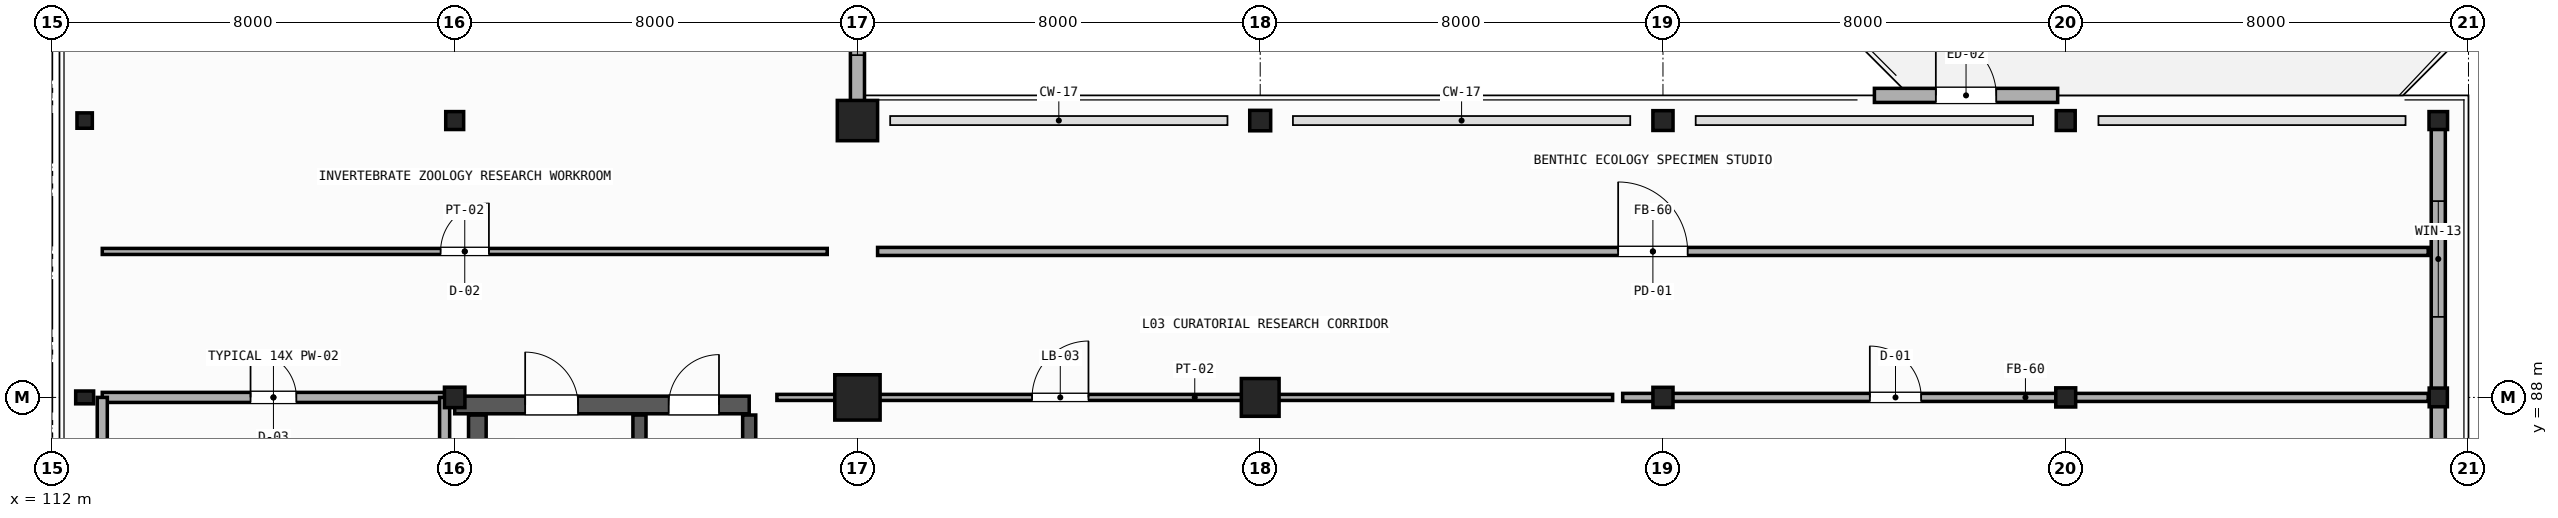
"""IFC4 building model, lengths in metres.
Left out: names, types, materials, properties, quantities, classifications, styles, units other than length and angle.
Written with IfcOpenShell. Run it as: python <this file> out.ifc"""

import sys

from ifc_helpers import new_model, si_unit, direction, frame, frame_2d, origin, origin_2d, place, context, subcontext, project, spatial, rectangle, hollow_rectangle, circle, hollow_circle, i_section, extrude, element, fill, save


model = new_model("IFC4")
c1 = context("Model", 3, precision=1e-05, world=origin(), true_north=direction((0.0, 1.0)))
c2 = subcontext(c1, "Body", "Model", "MODEL_VIEW")
j1 = project(units=[si_unit("LENGTHUNIT", "METRE"), si_unit("PLANEANGLEUNIT", "RADIAN")], contexts=[c1])
p1 = place(None, origin())
s1 = spatial("IfcSite", under=j1, at=p1, CompositionType="ELEMENT")
p2 = place(p1, origin())
s2 = spatial("IfcBuilding", under=s1, at=p2, CompositionType="ELEMENT")
p3 = place(p2, frame((0.0, 0.0, 15.0)))
s3 = spatial("IfcBuildingStorey", under=s2, at=p3, CompositionType="ELEMENT", Elevation=15.0)
p4 = place(p3, frame((112.65, 88.0, 0.0), z_axis=(0.0, 0.0, 1.0), x_axis=(0.0, 1.0, 0.0)))
e1 = element("IfcColumn", 1, at=p4, inside=s3, PredefinedType="COLUMN", context=c2, shape_type="SweptSolid", body=[
    extrude(hollow_rectangle(XDim=0.254, YDim=0.356, WallThickness=0.012, InnerFilletRadius=0.012, OuterFilletRadius=0.024, at=origin_2d()), origin(), (0.0, 0.0, 1.0), 4.58),
])
p5 = place(p3, frame((112.65, 93.5, 0.0), z_axis=(0.0, 0.0, 1.0), x_axis=(1.0, 0.0, 0.0)))
e2 = element("IfcColumn", 2, at=p5, inside=s3, PredefinedType="COLUMN", context=c2, shape_type="SweptSolid", body=[
    extrude(hollow_rectangle(XDim=0.305, YDim=0.305, WallThickness=0.012, InnerFilletRadius=0.012, OuterFilletRadius=0.024, at=origin_2d()), origin(), (0.0, 0.0, 1.0), 4.58),
])
p6 = place(p3, frame((120.0, 88.0, 0.0), z_axis=(0.0, 0.0, 1.0), x_axis=(1.0, 0.0, 0.0)))
e3 = element("IfcColumn", 3, at=p6, inside=s3, PredefinedType="COLUMN", context=c2, shape_type="SweptSolid", body=[
    extrude(hollow_circle(Radius=0.203, WallThickness=0.012, at=origin_2d()), origin(), (0.0, 0.0, 1.0), 4.58),
])
p7 = place(p3, frame((120.0, 93.5, 0.0), z_axis=(0.0, 0.0, 1.0), x_axis=(0.0, 1.0, 0.0)))
e4 = element("IfcColumn", 4, at=p7, inside=s3, PredefinedType="COLUMN", context=c2, shape_type="SweptSolid", body=[
    extrude(hollow_circle(Radius=0.178, WallThickness=0.012, at=origin_2d()), origin(), (0.0, 0.0, 1.0), 4.58),
])
p8 = place(p3, frame((128.0, 88.0, 0.0), z_axis=(0.0, 0.0, 1.0), x_axis=(0.0, 1.0, 0.0)))
e5 = element("IfcColumn", 5, at=p8, inside=s3, PredefinedType="COLUMN", context=c2, shape_type="SweptSolid", body=[
    extrude(rectangle(XDim=0.9, YDim=0.9, at=origin_2d()), origin(), (0.0, 0.0, 1.0), 4.58),
])
p9 = place(p3, frame((128.0, 93.5, 0.0), z_axis=(0.0, 0.0, 1.0), x_axis=(1.0, 0.0, 0.0)))
e6 = element("IfcColumn", 6, at=p9, inside=s3, PredefinedType="COLUMN", context=c2, shape_type="SweptSolid", body=[
    extrude(rectangle(XDim=0.8, YDim=0.8, at=origin_2d()), origin(), (0.0, 0.0, 1.0), 4.58),
])
p10 = place(p3, frame((136.0, 88.0, 0.0), z_axis=(0.0, 0.0, 1.0), x_axis=(1.0, 0.0, 0.0)))
e7 = element("IfcColumn", 7, at=p10, inside=s3, PredefinedType="COLUMN", context=c2, shape_type="SweptSolid", body=[
    extrude(circle(Radius=0.375, at=origin_2d()), origin(), (0.0, 0.0, 1.0), 4.58),
])
p11 = place(p3, frame((136.0, 93.5, 0.0), z_axis=(0.0, 0.0, 1.0), x_axis=(0.0, 1.0, 0.0)))
e8 = element("IfcColumn", 8, at=p11, inside=s3, PredefinedType="COLUMN", context=c2, shape_type="SweptSolid", body=[
    extrude(i_section(OverallWidth=0.406, OverallDepth=0.416, WebThickness=0.03, FlangeThickness=0.048, FilletRadius=0.015, at=origin_2d()), origin(), (0.0, 0.0, 1.0), 4.58),
])
p12 = place(p3, frame((144.0, 88.0, 0.0), z_axis=(0.0, 0.0, 1.0), x_axis=(0.0, 1.0, 0.0)))
e9 = element("IfcColumn", 9, at=p12, inside=s3, PredefinedType="COLUMN", context=c2, shape_type="SweptSolid", body=[
    extrude(i_section(OverallWidth=0.401, OverallDepth=0.399, WebThickness=0.025, FlangeThickness=0.04, FilletRadius=0.015, at=origin_2d()), origin(), (0.0, 0.0, 1.0), 4.58),
])
p13 = place(p3, frame((144.0, 93.5, 0.0), z_axis=(0.0, 0.0, 1.0), x_axis=(1.0, 0.0, 0.0)))
e10 = element("IfcColumn", 10, at=p13, inside=s3, PredefinedType="COLUMN", context=c2, shape_type="SweptSolid", body=[
    extrude(i_section(OverallWidth=0.4, OverallDepth=0.393, WebThickness=0.023, FlangeThickness=0.037, FilletRadius=0.015, at=origin_2d()), origin(), (0.0, 0.0, 1.0), 4.58),
])
p14 = place(p3, frame((152.0, 88.0, 0.0), z_axis=(0.0, 0.0, 1.0), x_axis=(1.0, 0.0, 0.0)))
e11 = element("IfcColumn", 11, at=p14, inside=s3, PredefinedType="COLUMN", context=c2, shape_type="SweptSolid", body=[
    extrude(i_section(OverallWidth=0.395, OverallDepth=0.38, WebThickness=0.019, FlangeThickness=0.03, FilletRadius=0.015, at=origin_2d()), origin(), (0.0, 0.0, 1.0), 4.8),
])
p15 = place(p3, frame((152.0, 93.5, 0.0), z_axis=(0.0, 0.0, 1.0), x_axis=(0.0, 1.0, 0.0)))
e12 = element("IfcColumn", 12, at=p15, inside=s3, PredefinedType="COLUMN", context=c2, shape_type="SweptSolid", body=[
    extrude(i_section(OverallWidth=0.394, OverallDepth=0.376, WebThickness=0.017, FlangeThickness=0.028, FilletRadius=0.015, at=origin_2d()), origin(), (0.0, 0.0, 1.0), 4.8),
])
p16 = place(p3, frame((159.4, 88.0, 0.0), z_axis=(0.0, 0.0, 1.0), x_axis=(0.0, 1.0, 0.0)))
e13 = element("IfcColumn", 13, at=p16, inside=s3, PredefinedType="COLUMN", context=c2, shape_type="SweptSolid", body=[
    extrude(i_section(OverallWidth=0.371, OverallDepth=0.361, WebThickness=0.012, FlangeThickness=0.02, FilletRadius=0.015, at=origin_2d()), origin(), (0.0, 0.0, 1.0), 4.8),
])
p17 = place(p3, frame((159.4, 93.5, 0.0), z_axis=(0.0, 0.0, 1.0), x_axis=(1.0, 0.0, 0.0)))
e14 = element("IfcColumn", 14, at=p17, inside=s3, PredefinedType="COLUMN", context=c2, shape_type="SweptSolid", body=[
    extrude(i_section(OverallWidth=0.368, OverallDepth=0.356, WebThickness=0.011, FlangeThickness=0.018, FilletRadius=0.015, at=origin_2d()), origin(), (0.0, 0.0, 1.0), 4.8),
])
p18 = place(p3, frame((148.2, 94.0, 0.0), z_axis=(0.0, 0.0, 1.0), x_axis=(1.0, 0.0, 0.0)))
e15 = element("IfcWall", 15, at=p18, inside=s3, PredefinedType="STANDARD", context=c2, shape_type="SweptSolid", body=[
    extrude(rectangle(XDim=3.64, YDim=0.28, at=frame_2d((1.82, 0.0))), origin(), (0.0, 0.0, 1.0), 4.3),
])
p19 = place(p18, frame((1.22, 0.0, 0.0)))
e16 = element("IfcOpeningElement", 16, at=p19, cuts=e15, PredefinedType="OPENING", context=c2, shape_type="SweptSolid", body=[
    extrude(rectangle(XDim=1.2, YDim=2.15, at=frame_2d((0.6, 1.075))), frame((0.0, 0.15, 0.0), z_axis=(0.0, -1.0, 0.0), x_axis=(1.0, 0.0, 0.0)), (0.0, 0.0, 1.0), 0.3),
])
p20 = place(p3, frame((159.4, 80.65, 0.0), z_axis=(0.0, 0.0, 1.0), x_axis=(0.0, 1.0, 0.0)))
e17 = element("IfcWall", 17, at=p20, inside=s3, PredefinedType="STANDARD", context=c2, shape_type="SweptSolid", body=[
    extrude(rectangle(XDim=7.35, YDim=0.28, at=frame_2d((3.675, 0.0))), origin(), (0.0, 0.0, 1.0), 4.48),
])
p21 = place(p20, frame((1.317, 0.0, 1.05)))
e18 = element("IfcOpeningElement", 18, at=p21, cuts=e17, PredefinedType="OPENING", context=c2, shape_type="SweptSolid", body=[
    extrude(rectangle(XDim=1.7, YDim=1.8, at=frame_2d((0.85, 0.9))), frame((0.0, 0.15, 0.0), z_axis=(0.0, -1.0, 0.0), x_axis=(1.0, 0.0, 0.0)), (0.0, 0.0, 1.0), 0.3),
])
p22 = place(p20, frame((4.333, 0.0, 1.05)))
e19 = element("IfcOpeningElement", 19, at=p22, cuts=e17, PredefinedType="OPENING", context=c2, shape_type="SweptSolid", body=[
    extrude(rectangle(XDim=1.7, YDim=1.8, at=frame_2d((0.85, 0.9))), frame((0.0, 0.15, 0.0), z_axis=(0.0, -1.0, 0.0), x_axis=(1.0, 0.0, 0.0)), (0.0, 0.0, 1.0), 0.3),
])
p23 = place(p3, frame((159.4, 88.0, 0.0), z_axis=(0.0, 0.0, 1.0), x_axis=(0.0, 1.0, 0.0)))
e20 = element("IfcWall", 20, at=p23, inside=s3, PredefinedType="STANDARD", context=c2, shape_type="SweptSolid", body=[
    extrude(rectangle(XDim=5.5, YDim=0.28, at=frame_2d((2.75, 0.0))), origin(), (0.0, 0.0, 1.0), 4.48),
])
p24 = place(p23, frame((1.6, 0.0, 2.25)))
e21 = element("IfcOpeningElement", 21, at=p24, cuts=e20, PredefinedType="OPENING", context=c2, shape_type="SweptSolid", body=[
    extrude(rectangle(XDim=2.3, YDim=1.2, at=frame_2d((1.15, 0.6))), frame((0.0, 0.15, 0.0), z_axis=(0.0, -1.0, 0.0), x_axis=(1.0, 0.0, 0.0)), (0.0, 0.0, 1.0), 0.3),
])
p25 = place(p3, frame((128.0, 93.5, 0.0), z_axis=(0.0, 0.0, 1.0), x_axis=(0.0, 1.0, 0.0)))
e22 = element("IfcWall", 22, at=p25, inside=s3, PredefinedType="STANDARD", context=c2, shape_type="SweptSolid", body=[
    extrude(rectangle(XDim=7.5, YDim=0.28, at=frame_2d((3.75, 0.0))), origin(), (0.0, 0.0, 1.0), 3.778),
])
p26 = place(p25, frame((1.3, 0.0, 2.3)))
e23 = element("IfcOpeningElement", 23, at=p26, cuts=e22, PredefinedType="OPENING", context=c2, shape_type="SweptSolid", body=[
    extrude(rectangle(XDim=1.8, YDim=1.1, at=frame_2d((0.9, 0.55))), frame((0.0, 0.15, 0.0), z_axis=(0.0, -1.0, 0.0), x_axis=(1.0, 0.0, 0.0)), (0.0, 0.0, 1.0), 0.3),
])
p27 = place(p25, frame((4.4, 0.0, 2.3)))
e24 = element("IfcOpeningElement", 24, at=p27, cuts=e22, PredefinedType="OPENING", context=c2, shape_type="SweptSolid", body=[
    extrude(rectangle(XDim=1.8, YDim=1.1, at=frame_2d((0.9, 0.55))), frame((0.0, 0.15, 0.0), z_axis=(0.0, -1.0, 0.0), x_axis=(1.0, 0.0, 0.0)), (0.0, 0.0, 1.0), 0.3),
])
p28 = place(p3, frame((120.0, 87.85, 0.0), z_axis=(0.0, 0.0, 1.0), x_axis=(1.0, 0.0, 0.0)))
e25 = element("IfcWall", 25, at=p28, inside=s3, PredefinedType="SHEAR", context=c2, shape_type="SweptSolid", body=[
    extrude(rectangle(XDim=5.85, YDim=0.35, at=frame_2d((2.925, 0.0))), origin(), (0.0, 0.0, 1.0), 4.57),
])
p29 = place(p28, frame((1.4, 0.0, 0.0)))
e26 = element("IfcOpeningElement", 26, at=p29, cuts=e25, PredefinedType="OPENING", context=c2, shape_type="SweptSolid", body=[
    extrude(rectangle(XDim=1.05, YDim=2.1, at=frame_2d((0.525, 1.05))), frame((0.0, 0.185, 0.0), z_axis=(0.0, -1.0, 0.0), x_axis=(1.0, 0.0, 0.0)), (0.0, 0.0, 1.0), 0.37),
])
p30 = place(p28, frame((4.25, 0.0, 0.0)))
e27 = element("IfcOpeningElement", 27, at=p30, cuts=e25, PredefinedType="OPENING", context=c2, shape_type="SweptSolid", body=[
    extrude(rectangle(XDim=1.0, YDim=2.15, at=frame_2d((0.5, 1.075))), frame((0.0, 0.185, 0.0), z_axis=(0.0, -1.0, 0.0), x_axis=(1.0, 0.0, 0.0)), (0.0, 0.0, 1.0), 0.37),
])
p31 = place(p3, frame((120.45, 80.7, 0.0), z_axis=(0.0, 0.0, 1.0), x_axis=(0.0, 1.0, 0.0)))
e28 = element("IfcWall", 28, at=p31, inside=s3, PredefinedType="SHEAR", context=c2, shape_type="SweptSolid", body=[
    extrude(rectangle(XDim=6.95, YDim=0.35, at=frame_2d((3.475, 0.0))), origin(), (0.0, 0.0, 1.0), 4.57),
])
for number, where, z_axis, x_axis in (
    (29, (125.85, 80.7, 0.0), (0.0, 0.0, 1.0), (0.0, 1.0, 0.0)),
    (30, (123.67, 80.7, 0.0), (0.0, 0.0, 1.0), (0.0, 1.0, 0.0)),
):
    element("IfcWall", number, at=place(p3, frame(where, z_axis=z_axis, x_axis=x_axis)), inside=s3, PredefinedType="SHEAR", context=c2, shape_type="SweptSolid", body=[
        extrude(rectangle(XDim=6.95, YDim=0.26, at=frame_2d((3.475, 0.0))), origin(), (0.0, 0.0, 1.0), 4.57),
    ])
p32 = place(p3, frame((113.0, 88.0, 0.0), z_axis=(0.0, 0.0, 1.0), x_axis=(1.0, 0.0, 0.0)))
e31 = element("IfcWall", 31, at=p32, inside=s3, PredefinedType="PLUMBINGWALL", context=c2, shape_type="SweptSolid", body=[
    extrude(rectangle(XDim=6.8, YDim=0.2, at=frame_2d((3.4, 0.0))), origin(), (0.0, 0.0, 1.0), 3.932),
])
p33 = place(p32, frame((2.945, 0.0, 0.0)))
e32 = element("IfcOpeningElement", 32, at=p33, cuts=e31, PredefinedType="OPENING", context=c2, shape_type="SweptSolid", body=[
    extrude(rectangle(XDim=0.91, YDim=2.1, at=frame_2d((0.455, 1.05))), frame((0.0, 0.11, 0.0), z_axis=(0.0, -1.0, 0.0), x_axis=(1.0, 0.0, 0.0)), (0.0, 0.0, 1.0), 0.22),
])
p34 = place(p3, frame((113.0, 80.8, 0.0), z_axis=(0.0, 0.0, 1.0), x_axis=(0.0, 1.0, 0.0)))
e33 = element("IfcWall", 33, at=p34, inside=s3, PredefinedType="PLUMBINGWALL", context=c2, shape_type="SweptSolid", body=[
    extrude(rectangle(XDim=7.2, YDim=0.2, at=frame_2d((3.6, 0.0))), origin(), (0.0, 0.0, 1.0), 4.29),
])
p35 = place(p3, frame((119.8, 80.8, 0.0), z_axis=(0.0, 0.0, 1.0), x_axis=(0.0, 1.0, 0.0)))
e34 = element("IfcWall", 34, at=p35, inside=s3, PredefinedType="PLUMBINGWALL", context=c2, shape_type="SweptSolid", body=[
    extrude(rectangle(XDim=7.2, YDim=0.2, at=frame_2d((3.6, 0.0))), origin(), (0.0, 0.0, 1.0), 4.007),
])
p36 = place(p3, frame((126.4, 88.0, 0.0), z_axis=(0.0, 0.0, 1.0), x_axis=(1.0, 0.0, 0.0)))
e35 = element("IfcWall", 35, at=p36, inside=s3, PredefinedType="PARTITIONING", context=c2, shape_type="SweptSolid", body=[
    extrude(rectangle(XDim=16.6, YDim=0.12, at=frame_2d((8.3, 0.0))), origin(), (0.0, 0.0, 1.0), 3.778),
])
p37 = place(p36, frame((5.069, 0.0, 0.0)))
e36 = element("IfcOpeningElement", 36, at=p37, cuts=e35, PredefinedType="OPENING", context=c2, shape_type="SweptSolid", body=[
    extrude(rectangle(XDim=1.12, YDim=2.15, at=frame_2d((0.56, 1.075))), frame((0.0, 0.07, 0.0), z_axis=(0.0, -1.0, 0.0), x_axis=(1.0, 0.0, 0.0)), (0.0, 0.0, 1.0), 0.14),
])
p38 = place(p3, frame((143.2, 88.0, 0.0), z_axis=(0.0, 0.0, 1.0), x_axis=(1.0, 0.0, 0.0)))
e37 = element("IfcWall", 37, at=p38, inside=s3, PredefinedType="PARTITIONING", context=c2, shape_type="SweptSolid", body=[
    extrude(rectangle(XDim=16.0, YDim=0.16, at=frame_2d((8.0, 0.0))), origin(), (0.0, 0.0, 1.0), 3.778),
])
p39 = place(p38, frame((4.909, 0.0, 0.0)))
e38 = element("IfcOpeningElement", 38, at=p39, cuts=e37, PredefinedType="OPENING", context=c2, shape_type="SweptSolid", body=[
    extrude(rectangle(XDim=1.02, YDim=2.15, at=frame_2d((0.51, 1.075))), frame((0.0, 0.09, 0.0), z_axis=(0.0, -1.0, 0.0), x_axis=(1.0, 0.0, 0.0)), (0.0, 0.0, 1.0), 0.18),
])
p40 = place(p3, frame((113.0, 90.9, 0.0), z_axis=(0.0, 0.0, 1.0), x_axis=(1.0, 0.0, 0.0)))
e39 = element("IfcWall", 39, at=p40, inside=s3, PredefinedType="PARTITIONING", context=c2, shape_type="SweptSolid", body=[
    extrude(rectangle(XDim=14.4, YDim=0.12, at=frame_2d((7.2, 0.0))), origin(), (0.0, 0.0, 1.0), 3.778),
])
p41 = place(p40, frame((6.72, 0.0, 0.0)))
e40 = element("IfcOpeningElement", 40, at=p41, cuts=e39, PredefinedType="OPENING", context=c2, shape_type="SweptSolid", body=[
    extrude(rectangle(XDim=0.96, YDim=2.1, at=frame_2d((0.48, 1.05))), frame((0.0, 0.07, 0.0), z_axis=(0.0, -1.0, 0.0), x_axis=(1.0, 0.0, 0.0)), (0.0, 0.0, 1.0), 0.14),
])
p42 = place(p3, frame((128.4, 90.9, 0.0), z_axis=(0.0, 0.0, 1.0), x_axis=(1.0, 0.0, 0.0)))
e41 = element("IfcWall", 41, at=p42, inside=s3, PredefinedType="PARTITIONING", context=c2, shape_type="SweptSolid", body=[
    extrude(rectangle(XDim=30.8, YDim=0.16, at=frame_2d((15.4, 0.0))), origin(), (0.0, 0.0, 1.0), 3.857),
])
p43 = place(p42, frame((14.71, 0.0, 0.0)))
e42 = element("IfcOpeningElement", 42, at=p43, cuts=e41, PredefinedType="OPENING", context=c2, shape_type="SweptSolid", body=[
    extrude(rectangle(XDim=1.38, YDim=2.25, at=frame_2d((0.69, 1.125))), frame((0.0, 0.09, 0.0), z_axis=(0.0, -1.0, 0.0), x_axis=(1.0, 0.0, 0.0)), (0.0, 0.0, 1.0), 0.18),
])
p44 = place(p19, origin())
e43 = element("IfcDoor", 43, at=p44, inside=s3, OperationType="SINGLE_SWING_LEFT", PredefinedType="DOOR", context=c2, shape_type="SweptSolid", body=[
    extrude(rectangle(XDim=1.2, YDim=2.15, at=frame_2d((0.6, 1.075))), frame((0.0, 0.025, 0.0), z_axis=(0.0, -1.0, 0.0), x_axis=(1.0, 0.0, 0.0)), (0.0, 0.0, 1.0), 0.05),
])
fill(e16, e43)
p45 = place(p24, origin())
e44 = element("IfcWindow", 44, at=p45, inside=s3, PartitioningType="SINGLE_PANEL", PredefinedType="WINDOW", context=c2, shape_type="SweptSolid", body=[
    extrude(rectangle(XDim=2.3, YDim=1.2, at=frame_2d((1.15, 0.6))), frame((0.0, 0.03, 0.0), z_axis=(0.0, -1.0, 0.0), x_axis=(1.0, 0.0, 0.0)), (0.0, 0.0, 1.0), 0.06),
])
fill(e21, e44)
p46 = place(p26, origin())
e45 = element("IfcWindow", 45, at=p46, inside=s3, PartitioningType="SINGLE_PANEL", PredefinedType="WINDOW", context=c2, shape_type="SweptSolid", body=[
    extrude(rectangle(XDim=1.8, YDim=1.1, at=frame_2d((0.9, 0.55))), frame((0.0, 0.03, 0.0), z_axis=(0.0, -1.0, 0.0), x_axis=(1.0, 0.0, 0.0)), (0.0, 0.0, 1.0), 0.06),
])
fill(e23, e45)
p47 = place(p29, origin())
e46 = element("IfcDoor", 46, at=p47, inside=s3, OperationType="SINGLE_SWING_LEFT", PredefinedType="DOOR", context=c2, shape_type="SweptSolid", body=[
    extrude(rectangle(XDim=1.05, YDim=2.1, at=frame_2d((0.525, 1.05))), frame((0.0, 0.025, 0.0), z_axis=(0.0, -1.0, 0.0), x_axis=(1.0, 0.0, 0.0)), (0.0, 0.0, 1.0), 0.05),
])
fill(e26, e46)
p48 = place(p30, origin())
e47 = element("IfcDoor", 47, at=p48, inside=s3, OperationType="SINGLE_SWING_RIGHT", PredefinedType="DOOR", context=c2, shape_type="SweptSolid", body=[
    extrude(rectangle(XDim=1.0, YDim=2.15, at=frame_2d((0.5, 1.075))), frame((0.0, 0.025, 0.0), z_axis=(0.0, -1.0, 0.0), x_axis=(1.0, 0.0, 0.0)), (0.0, 0.0, 1.0), 0.05),
])
fill(e27, e47)
p49 = place(p33, origin())
e48 = element("IfcDoor", 48, at=p49, inside=s3, OperationType="SINGLE_SWING_LEFT", PredefinedType="DOOR", context=c2, shape_type="SweptSolid", body=[
    extrude(rectangle(XDim=0.91, YDim=2.1, at=frame_2d((0.455, 1.05))), frame((0.0, 0.025, 0.0), z_axis=(0.0, -1.0, 0.0), x_axis=(1.0, 0.0, 0.0)), (0.0, 0.0, 1.0), 0.05),
])
fill(e32, e48)
p50 = place(p37, origin())
e49 = element("IfcDoor", 49, at=p50, inside=s3, OperationType="SINGLE_SWING_RIGHT", PredefinedType="DOOR", context=c2, shape_type="SweptSolid", body=[
    extrude(rectangle(XDim=1.12, YDim=2.15, at=frame_2d((0.56, 1.075))), frame((0.0, 0.025, 0.0), z_axis=(0.0, -1.0, 0.0), x_axis=(1.0, 0.0, 0.0)), (0.0, 0.0, 1.0), 0.05),
])
fill(e36, e49)
p51 = place(p39, origin())
e50 = element("IfcDoor", 50, at=p51, inside=s3, OperationType="SINGLE_SWING_LEFT", PredefinedType="DOOR", context=c2, shape_type="SweptSolid", body=[
    extrude(rectangle(XDim=1.02, YDim=2.15, at=frame_2d((0.51, 1.075))), frame((0.0, 0.025, 0.0), z_axis=(0.0, -1.0, 0.0), x_axis=(1.0, 0.0, 0.0)), (0.0, 0.0, 1.0), 0.05),
])
fill(e38, e50)
p52 = place(p41, origin())
e51 = element("IfcDoor", 51, at=p52, inside=s3, OperationType="SINGLE_SWING_RIGHT", PredefinedType="DOOR", context=c2, shape_type="SweptSolid", body=[
    extrude(rectangle(XDim=0.96, YDim=2.1, at=frame_2d((0.48, 1.05))), frame((0.0, 0.025, 0.0), z_axis=(0.0, -1.0, 0.0), x_axis=(1.0, 0.0, 0.0)), (0.0, 0.0, 1.0), 0.05),
])
fill(e40, e51)
p53 = place(p43, origin())
e52 = element("IfcDoor", 52, at=p53, inside=s3, OperationType="SINGLE_SWING_LEFT", PredefinedType="DOOR", context=c2, shape_type="SweptSolid", body=[
    extrude(rectangle(XDim=1.38, YDim=2.25, at=frame_2d((0.69, 1.125))), frame((0.0, 0.025, 0.0), z_axis=(0.0, -1.0, 0.0), x_axis=(1.0, 0.0, 0.0)), (0.0, 0.0, 1.0), 0.05),
])
fill(e42, e52)
save(model, sys.argv[1])
